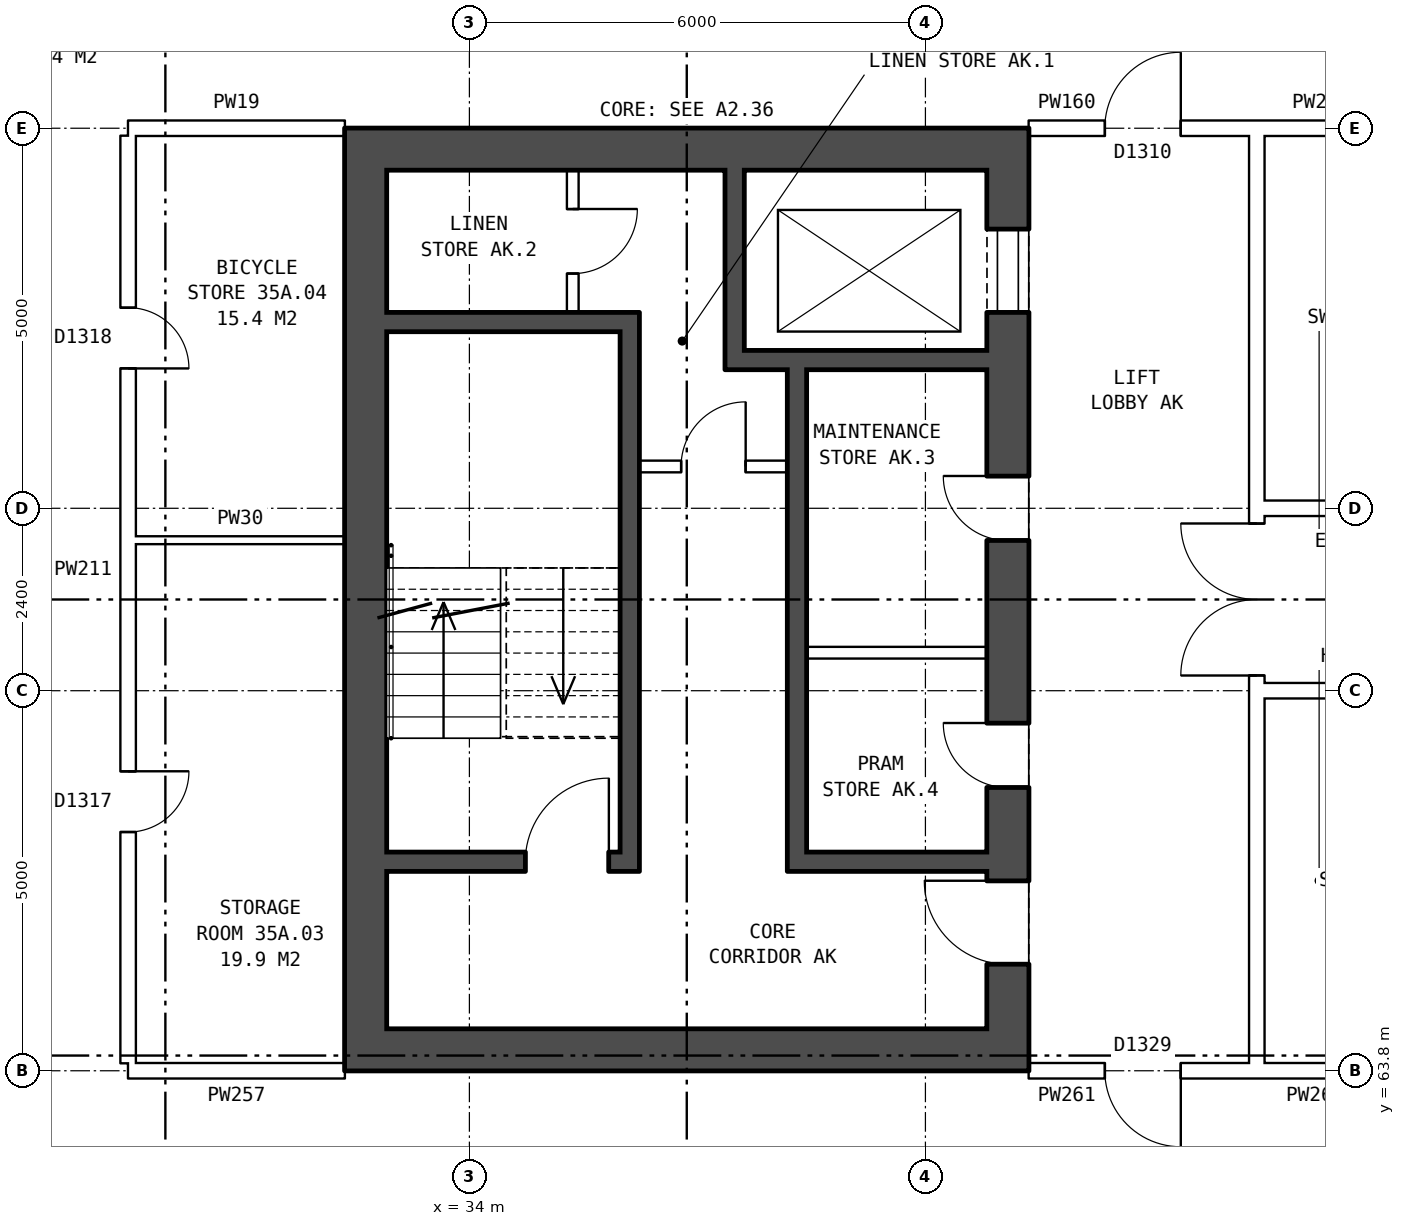
"""IFC4 building model, lengths in metres.
Left out: names, types, materials, properties, quantities, classifications, styles, units other than length and angle.
Written with IfcOpenShell. Run it as: python <this file> out.ifc"""

import sys

from ifc_helpers import new_model, si_unit, direction, frame, frame_2d, origin, place, context, subcontext, project, spatial, rectangle, extrude, element, fill, save


model = new_model("IFC4")
c1 = context("Model", 3, precision=1e-05, world=origin(), true_north=direction((0.0, 1.0)))
c2 = subcontext(c1, "Body", "Model", "MODEL_VIEW")
j1 = project(units=[si_unit("LENGTHUNIT", "METRE"), si_unit("PLANEANGLEUNIT", "RADIAN")], contexts=[c1])
p1 = place(None, origin())
s1 = spatial("IfcSite", under=j1, at=p1, CompositionType="ELEMENT")
p2 = place(p1, origin())
s2 = spatial("IfcBuilding", under=s1, at=p2, CompositionType="ELEMENT")
p3 = place(p2, frame((0.0, 0.0, 126.8)))
s3 = spatial("IfcBuildingStorey", under=s2, at=p3, CompositionType="ELEMENT", Elevation=126.8)
p4 = place(p3, frame((41.085, 76.2, 0.0), z_axis=(0.0, 0.0, 1.0), x_axis=(0.0, -1.0, 0.0)))
e1 = element("IfcWall", 1, at=p4, inside=s3, PredefinedType="SHEAR", context=c2, shape_type="SweptSolid", body=[
    extrude(rectangle(XDim=12.4, YDim=0.55, at=frame_2d((6.2, 0.0))), origin(), (0.0, 0.0, 1.0), 2.85),
])
p5 = place(p4, frame((1.325, 0.0, 0.0)))
e2 = element("IfcOpeningElement", 2, at=p5, cuts=e1, PredefinedType="OPENING", context=c2, shape_type="SweptSolid", body=[
    extrude(rectangle(XDim=1.1, YDim=2.1, at=frame_2d((0.55, 1.05))), frame((0.0, 0.285, 0.0), z_axis=(0.0, -1.0, 0.0), x_axis=(1.0, 0.0, 0.0)), (0.0, 0.0, 1.0), 0.57),
])
p6 = place(p4, frame((4.575, 0.0, 0.0)))
e3 = element("IfcOpeningElement", 3, at=p6, cuts=e1, PredefinedType="OPENING", context=c2, shape_type="SweptSolid", body=[
    extrude(rectangle(XDim=0.85, YDim=2.1, at=frame_2d((0.425, 1.05))), frame((0.0, 0.285, 0.0), z_axis=(0.0, -1.0, 0.0), x_axis=(1.0, 0.0, 0.0)), (0.0, 0.0, 1.0), 0.57),
])
p7 = place(p4, frame((7.825, 0.0, 0.0)))
e4 = element("IfcOpeningElement", 4, at=p7, cuts=e1, PredefinedType="OPENING", context=c2, shape_type="SweptSolid", body=[
    extrude(rectangle(XDim=0.85, YDim=2.1, at=frame_2d((0.425, 1.05))), frame((0.0, 0.285, 0.0), z_axis=(0.0, -1.0, 0.0), x_axis=(1.0, 0.0, 0.0)), (0.0, 0.0, 1.0), 0.57),
])
p8 = place(p4, frame((9.9, 0.0, 0.0)))
e5 = element("IfcOpeningElement", 5, at=p8, cuts=e1, PredefinedType="OPENING", context=c2, shape_type="SweptSolid", body=[
    extrude(rectangle(XDim=1.1, YDim=2.1, at=frame_2d((0.55, 1.05))), frame((0.0, 0.285, 0.0), z_axis=(0.0, -1.0, 0.0), x_axis=(1.0, 0.0, 0.0)), (0.0, 0.0, 1.0), 0.57),
])
p9 = place(p3, frame((32.635, 76.2, 0.0), z_axis=(0.0, 0.0, 1.0), x_axis=(0.0, -1.0, 0.0)))
e6 = element("IfcWall", 6, at=p9, inside=s3, PredefinedType="SHEAR", context=c2, shape_type="SweptSolid", body=[
    extrude(rectangle(XDim=12.4, YDim=0.55, at=frame_2d((6.2, 0.0))), origin(), (0.0, 0.0, 1.0), 2.85),
])
for number, where, z_axis, x_axis in (
    (7, (40.81, 75.925, 0.0), (0.0, 0.0, 1.0), (-1.0, 0.0, 0.0)),
    (8, (40.81, 64.075, 0.0), (0.0, 0.0, 1.0), (-1.0, 0.0, 0.0)),
):
    element("IfcWall", number, at=place(p3, frame(where, z_axis=z_axis, x_axis=x_axis)), inside=s3, PredefinedType="SHEAR", context=c2, shape_type="SweptSolid", body=[
        extrude(rectangle(XDim=7.9, YDim=0.55, at=frame_2d((3.95, 0.0))), origin(), (0.0, 0.0, 1.0), 2.85),
    ])
p10 = place(p3, frame((35.985, 73.65, 0.0), z_axis=(0.0, 0.0, 1.0), x_axis=(-1.0, 0.0, 0.0)))
e9 = element("IfcWall", 9, at=p10, inside=s3, PredefinedType="SHEAR", context=c2, shape_type="SweptSolid", body=[
    extrude(rectangle(XDim=3.075, YDim=0.25, at=frame_2d((1.538, 0.0))), origin(), (0.0, 0.0, 1.0), 2.85),
])
p11 = place(p3, frame((40.81, 73.15, 0.0), z_axis=(0.0, 0.0, 1.0), x_axis=(-1.0, 0.0, 0.0)))
e10 = element("IfcWall", 10, at=p11, inside=s3, PredefinedType="SHEAR", context=c2, shape_type="SweptSolid", body=[
    extrude(rectangle(XDim=3.445, YDim=0.25, at=frame_2d((1.723, 0.0))), origin(), (0.0, 0.0, 1.0), 2.85),
])
p12 = place(p3, frame((38.185, 71.75, 0.0), z_axis=(0.0, 0.0, 1.0), x_axis=(-1.0, 0.0, 0.0)))
e11 = element("IfcWall", 11, at=p12, inside=s3, PredefinedType="PARTITIONING", context=c2, shape_type="SweptSolid", body=[
    extrude(rectangle(XDim=1.95, YDim=0.15, at=frame_2d((0.975, 0.0))), origin(), (0.0, 0.0, 1.0), 2.85),
])
p13 = place(p12, frame((0.55, 0.0, 0.0)))
e12 = element("IfcOpeningElement", 12, at=p13, cuts=e11, PredefinedType="OPENING", context=c2, shape_type="SweptSolid", body=[
    extrude(rectangle(XDim=0.85, YDim=2.1, at=frame_2d((0.425, 1.05))), frame((0.0, 0.085, 0.0), z_axis=(0.0, -1.0, 0.0), x_axis=(1.0, 0.0, 0.0)), (0.0, 0.0, 1.0), 0.17),
])
p14 = place(p3, frame((40.81, 69.3, 0.0), z_axis=(0.0, 0.0, 1.0), x_axis=(-1.0, 0.0, 0.0)))
e13 = element("IfcWall", 13, at=p14, inside=s3, PredefinedType="PARTITIONING", context=c2, shape_type="SweptSolid", body=[
    extrude(rectangle(XDim=2.375, YDim=0.15, at=frame_2d((1.188, 0.0))), origin(), (0.0, 0.0, 1.0), 2.85),
])
p15 = place(p3, frame((40.81, 66.55, 0.0), z_axis=(0.0, 0.0, 1.0), x_axis=(-1.0, 0.0, 0.0)))
e14 = element("IfcWall", 14, at=p15, inside=s3, PredefinedType="SHEAR", context=c2, shape_type="SweptSolid", body=[
    extrude(rectangle(XDim=2.375, YDim=0.25, at=frame_2d((1.188, 0.0))), origin(), (0.0, 0.0, 1.0), 2.85),
])
p16 = place(p3, frame((35.985, 66.55, 0.0), z_axis=(0.0, 0.0, 1.0), x_axis=(-1.0, 0.0, 0.0)))
e15 = element("IfcWall", 15, at=p16, inside=s3, PredefinedType="SHEAR", context=c2, shape_type="SweptSolid", body=[
    extrude(rectangle(XDim=3.075, YDim=0.25, at=frame_2d((1.538, 0.0))), origin(), (0.0, 0.0, 1.0), 2.85),
])
p17 = place(p16, frame((0.15, 0.0, 0.0)))
e16 = element("IfcOpeningElement", 16, at=p17, cuts=e15, PredefinedType="OPENING", context=c2, shape_type="SweptSolid", body=[
    extrude(rectangle(XDim=1.1, YDim=2.1, at=frame_2d((0.55, 1.05))), frame((0.0, 0.135, 0.0), z_axis=(0.0, -1.0, 0.0), x_axis=(1.0, 0.0, 0.0)), (0.0, 0.0, 1.0), 0.27),
])
p18 = place(p3, frame((38.31, 73.025, 0.0), z_axis=(0.0, 0.0, 1.0), x_axis=(0.0, -1.0, 0.0)))
e17 = element("IfcWall", 17, at=p18, inside=s3, PredefinedType="SHEAR", context=c2, shape_type="SweptSolid", body=[
    extrude(rectangle(XDim=6.6, YDim=0.25, at=frame_2d((3.3, 0.0))), origin(), (0.0, 0.0, 1.0), 2.85),
])
p19 = place(p3, frame((37.49, 75.65, 0.0), z_axis=(0.0, 0.0, 1.0), x_axis=(0.0, -1.0, 0.0)))
e18 = element("IfcWall", 18, at=p19, inside=s3, PredefinedType="SHEAR", context=c2, shape_type="SweptSolid", body=[
    extrude(rectangle(XDim=2.375, YDim=0.25, at=frame_2d((1.188, 0.0))), origin(), (0.0, 0.0, 1.0), 2.85),
])
p20 = place(p3, frame((36.11, 73.775, 0.0), z_axis=(0.0, 0.0, 1.0), x_axis=(0.0, -1.0, 0.0)))
e19 = element("IfcWall", 19, at=p20, inside=s3, PredefinedType="SHEAR", context=c2, shape_type="SweptSolid", body=[
    extrude(rectangle(XDim=7.35, YDim=0.25, at=frame_2d((3.675, 0.0))), origin(), (0.0, 0.0, 1.0), 2.85),
])
p21 = place(p3, frame((35.36, 75.65, 0.0), z_axis=(0.0, 0.0, 1.0), x_axis=(0.0, -1.0, 0.0)))
e20 = element("IfcWall", 20, at=p21, inside=s3, PredefinedType="PARTITIONING", context=c2, shape_type="SweptSolid", body=[
    extrude(rectangle(XDim=1.875, YDim=0.15, at=frame_2d((0.938, 0.0))), origin(), (0.0, 0.0, 1.0), 2.85),
])
p22 = place(p21, frame((0.512, 0.0, 0.0)))
e21 = element("IfcOpeningElement", 21, at=p22, cuts=e20, PredefinedType="OPENING", context=c2, shape_type="SweptSolid", body=[
    extrude(rectangle(XDim=0.85, YDim=2.1, at=frame_2d((0.425, 1.05))), frame((0.0, 0.085, 0.0), z_axis=(0.0, -1.0, 0.0), x_axis=(1.0, 0.0, 0.0)), (0.0, 0.0, 1.0), 0.17),
])
p23 = place(p3, frame((44.36, 63.9, 0.0), z_axis=(0.0, 0.0, 1.0), x_axis=(0.0, 1.0, 0.0)))
e22 = element("IfcWall", 22, at=p23, inside=s3, PredefinedType="PARTITIONING", context=c2, shape_type="SweptSolid", body=[
    extrude(rectangle(XDim=12.2, YDim=0.2, at=frame_2d((6.1, 0.0))), origin(), (0.0, 0.0, 1.0), 2.85),
])
p24 = place(p23, frame((5.1, 0.0, 0.0)))
e23 = element("IfcOpeningElement", 23, at=p24, cuts=e22, PredefinedType="OPENING", context=c2, shape_type="SweptSolid", body=[
    extrude(rectangle(XDim=2.0, YDim=2.1, at=frame_2d((1.0, 1.05))), frame((0.0, 0.11, 0.0), z_axis=(0.0, -1.0, 0.0), x_axis=(1.0, 0.0, 0.0)), (0.0, 0.0, 1.0), 0.22),
])
p25 = place(p3, frame((29.51, 63.8, 0.0), z_axis=(0.0, 0.0, 1.0), x_axis=(1.0, 0.0, 0.0)))
e24 = element("IfcWall", 24, at=p25, inside=s3, PredefinedType="PARTITIONING", context=c2, shape_type="SweptSolid", body=[
    extrude(rectangle(XDim=2.85, YDim=0.2, at=frame_2d((1.425, 0.0))), origin(), (0.0, 0.0, 1.0), 2.85),
])
p26 = place(p3, frame((41.36, 63.8, 0.0), z_axis=(0.0, 0.0, 1.0), x_axis=(1.0, 0.0, 0.0)))
e25 = element("IfcWall", 25, at=p26, inside=s3, PredefinedType="PARTITIONING", context=c2, shape_type="SweptSolid", body=[
    extrude(rectangle(XDim=3.0, YDim=0.2, at=frame_2d((1.5, 0.0))), origin(), (0.0, 0.0, 1.0), 2.85),
])
p27 = place(p26, frame((1.0, 0.0, 0.0)))
e26 = element("IfcOpeningElement", 26, at=p27, cuts=e25, PredefinedType="OPENING", context=c2, shape_type="SweptSolid", body=[
    extrude(rectangle(XDim=1.0, YDim=2.1, at=frame_2d((0.5, 1.05))), frame((0.0, 0.11, 0.0), z_axis=(0.0, -1.0, 0.0), x_axis=(1.0, 0.0, 0.0)), (0.0, 0.0, 1.0), 0.22),
])
p28 = place(p3, frame((44.36, 63.8, 0.0), z_axis=(0.0, 0.0, 1.0), x_axis=(1.0, 0.0, 0.0)))
e27 = element("IfcWall", 27, at=p28, inside=s3, PredefinedType="PARTITIONING", context=c2, shape_type="SweptSolid", body=[
    extrude(rectangle(XDim=1.54, YDim=0.2, at=frame_2d((0.77, 0.0))), origin(), (0.0, 0.0, 1.0), 2.85),
])
p29 = place(p3, frame((44.36, 68.8, 0.0), z_axis=(0.0, 0.0, 1.0), x_axis=(1.0, 0.0, 0.0)))
e28 = element("IfcWall", 28, at=p29, inside=s3, PredefinedType="PARTITIONING", context=c2, shape_type="SweptSolid", body=[
    extrude(rectangle(XDim=19.28, YDim=0.2, at=frame_2d((9.64, 0.0))), origin(), (0.0, 0.0, 1.0), 2.85),
])
p30 = place(p29, frame((14.64, 0.0, 0.0)))
e29 = element("IfcOpeningElement", 29, at=p30, cuts=e28, PredefinedType="OPENING", context=c2, shape_type="SweptSolid", body=[
    extrude(rectangle(XDim=1.0, YDim=2.1, at=frame_2d((0.5, 1.05))), frame((0.0, 0.11, 0.0), z_axis=(0.0, -1.0, 0.0), x_axis=(1.0, 0.0, 0.0)), (0.0, 0.0, 1.0), 0.22),
])
p31 = place(p29, frame((5.64, 0.0, 0.0)))
e30 = element("IfcOpeningElement", 30, at=p31, cuts=e28, PredefinedType="OPENING", context=c2, shape_type="SweptSolid", body=[
    extrude(rectangle(XDim=1.0, YDim=2.1, at=frame_2d((0.5, 1.05))), frame((0.0, 0.11, 0.0), z_axis=(0.0, -1.0, 0.0), x_axis=(1.0, 0.0, 0.0)), (0.0, 0.0, 1.0), 0.22),
])
p32 = place(p3, frame((29.61, 70.78, 0.0), z_axis=(0.0, 0.0, 1.0), x_axis=(1.0, 0.0, 0.0)))
e31 = element("IfcWall", 31, at=p32, inside=s3, PredefinedType="PARTITIONING", context=c2, shape_type="SweptSolid", body=[
    extrude(rectangle(XDim=2.75, YDim=0.1, at=frame_2d((1.375, 0.0))), origin(), (0.0, 0.0, 1.0), 2.85),
])
p33 = place(p3, frame((44.36, 71.2, 0.0), z_axis=(0.0, 0.0, 1.0), x_axis=(1.0, 0.0, 0.0)))
e32 = element("IfcWall", 32, at=p33, inside=s3, PredefinedType="PARTITIONING", context=c2, shape_type="SweptSolid", body=[
    extrude(rectangle(XDim=19.28, YDim=0.2, at=frame_2d((9.64, 0.0))), origin(), (0.0, 0.0, 1.0), 2.85),
])
p34 = place(p33, frame((14.64, 0.0, 0.0)))
e33 = element("IfcOpeningElement", 33, at=p34, cuts=e32, PredefinedType="OPENING", context=c2, shape_type="SweptSolid", body=[
    extrude(rectangle(XDim=1.0, YDim=2.1, at=frame_2d((0.5, 1.05))), frame((0.0, 0.11, 0.0), z_axis=(0.0, -1.0, 0.0), x_axis=(1.0, 0.0, 0.0)), (0.0, 0.0, 1.0), 0.22),
])
p35 = place(p33, frame((5.64, 0.0, 0.0)))
e34 = element("IfcOpeningElement", 34, at=p35, cuts=e32, PredefinedType="OPENING", context=c2, shape_type="SweptSolid", body=[
    extrude(rectangle(XDim=1.0, YDim=2.1, at=frame_2d((0.5, 1.05))), frame((0.0, 0.11, 0.0), z_axis=(0.0, -1.0, 0.0), x_axis=(1.0, 0.0, 0.0)), (0.0, 0.0, 1.0), 0.22),
])
p36 = place(p3, frame((29.51, 76.2, 0.0), z_axis=(0.0, 0.0, 1.0), x_axis=(1.0, 0.0, 0.0)))
e35 = element("IfcWall", 35, at=p36, inside=s3, PredefinedType="PARTITIONING", context=c2, shape_type="SweptSolid", body=[
    extrude(rectangle(XDim=2.85, YDim=0.2, at=frame_2d((1.425, 0.0))), origin(), (0.0, 0.0, 1.0), 2.85),
])
p37 = place(p3, frame((41.36, 76.2, 0.0), z_axis=(0.0, 0.0, 1.0), x_axis=(1.0, 0.0, 0.0)))
e36 = element("IfcWall", 36, at=p37, inside=s3, PredefinedType="PARTITIONING", context=c2, shape_type="SweptSolid", body=[
    extrude(rectangle(XDim=3.0, YDim=0.2, at=frame_2d((1.5, 0.0))), origin(), (0.0, 0.0, 1.0), 2.85),
])
p38 = place(p37, frame((1.0, 0.0, 0.0)))
e37 = element("IfcOpeningElement", 37, at=p38, cuts=e36, PredefinedType="OPENING", context=c2, shape_type="SweptSolid", body=[
    extrude(rectangle(XDim=1.0, YDim=2.1, at=frame_2d((0.5, 1.05))), frame((0.0, 0.11, 0.0), z_axis=(0.0, -1.0, 0.0), x_axis=(1.0, 0.0, 0.0)), (0.0, 0.0, 1.0), 0.22),
])
p39 = place(p3, frame((44.36, 76.2, 0.0), z_axis=(0.0, 0.0, 1.0), x_axis=(1.0, 0.0, 0.0)))
e38 = element("IfcWall", 38, at=p39, inside=s3, PredefinedType="PARTITIONING", context=c2, shape_type="SweptSolid", body=[
    extrude(rectangle(XDim=1.54, YDim=0.2, at=frame_2d((0.77, 0.0))), origin(), (0.0, 0.0, 1.0), 2.85),
])
p40 = place(p3, frame((29.51, 63.9, 0.0), z_axis=(0.0, 0.0, 1.0), x_axis=(0.0, 1.0, 0.0)))
e39 = element("IfcWall", 39, at=p40, inside=s3, PredefinedType="PARTITIONING", context=c2, shape_type="SweptSolid", body=[
    extrude(rectangle(XDim=12.2, YDim=0.2, at=frame_2d((6.1, 0.0))), origin(), (0.0, 0.0, 1.0), 2.85),
])
p41 = place(p40, frame((3.04, 0.0, 0.0)))
e40 = element("IfcOpeningElement", 40, at=p41, cuts=e39, PredefinedType="OPENING", context=c2, shape_type="SweptSolid", body=[
    extrude(rectangle(XDim=0.8, YDim=2.1, at=frame_2d((0.4, 1.05))), frame((0.0, 0.11, 0.0), z_axis=(0.0, -1.0, 0.0), x_axis=(1.0, 0.0, 0.0)), (0.0, 0.0, 1.0), 0.22),
])
p42 = place(p40, frame((9.14, 0.0, 0.0)))
e41 = element("IfcOpeningElement", 41, at=p42, cuts=e39, PredefinedType="OPENING", context=c2, shape_type="SweptSolid", body=[
    extrude(rectangle(XDim=0.8, YDim=2.1, at=frame_2d((0.4, 1.05))), frame((0.0, 0.11, 0.0), z_axis=(0.0, -1.0, 0.0), x_axis=(1.0, 0.0, 0.0)), (0.0, 0.0, 1.0), 0.22),
])
p43 = place(p5, origin())
e42 = element("IfcDoor", 42, at=p43, inside=s3, OperationType="DOUBLE_DOOR_SLIDING", PredefinedType="DOOR", context=c2, shape_type="SweptSolid", body=[
    extrude(rectangle(XDim=1.1, YDim=2.1, at=frame_2d((0.55, 1.05))), frame((0.0, -0.21, 0.0), z_axis=(0.0, -1.0, 0.0), x_axis=(1.0, 0.0, 0.0)), (0.0, 0.0, 1.0), 0.05),
])
fill(e2, e42)
p44 = place(p6, frame((0.85, 0.0, 0.0), z_axis=(0.0, 0.0, 1.0), x_axis=(-1.0, 0.0, 0.0)))
e43 = element("IfcDoor", 43, at=p44, inside=s3, OperationType="SINGLE_SWING_RIGHT", PredefinedType="DOOR", context=c2, shape_type="SweptSolid", body=[
    extrude(rectangle(XDim=0.85, YDim=2.1, at=frame_2d((0.425, 1.05))), frame((0.0, 0.26, 0.0), z_axis=(0.0, -1.0, 0.0), x_axis=(1.0, 0.0, 0.0)), (0.0, 0.0, 1.0), 0.05),
])
fill(e3, e43)
p45 = place(p7, frame((0.85, 0.0, 0.0), z_axis=(0.0, 0.0, 1.0), x_axis=(-1.0, 0.0, 0.0)))
e44 = element("IfcDoor", 44, at=p45, inside=s3, OperationType="SINGLE_SWING_RIGHT", PredefinedType="DOOR", context=c2, shape_type="SweptSolid", body=[
    extrude(rectangle(XDim=0.85, YDim=2.1, at=frame_2d((0.425, 1.05))), frame((0.0, 0.26, 0.0), z_axis=(0.0, -1.0, 0.0), x_axis=(1.0, 0.0, 0.0)), (0.0, 0.0, 1.0), 0.05),
])
fill(e4, e44)
p46 = place(p8, frame((1.1, 0.0, 0.0), z_axis=(0.0, 0.0, 1.0), x_axis=(-1.0, 0.0, 0.0)))
e45 = element("IfcDoor", 45, at=p46, inside=s3, OperationType="SINGLE_SWING_RIGHT", PredefinedType="DOOR", context=c2, shape_type="SweptSolid", body=[
    extrude(rectangle(XDim=1.1, YDim=2.1, at=frame_2d((0.55, 1.05))), frame((0.0, 0.26, 0.0), z_axis=(0.0, -1.0, 0.0), x_axis=(1.0, 0.0, 0.0)), (0.0, 0.0, 1.0), 0.05),
])
fill(e5, e45)
p47 = place(p17, frame((1.1, 0.0, 0.0), z_axis=(0.0, 0.0, 1.0), x_axis=(-1.0, 0.0, 0.0)))
e46 = element("IfcDoor", 46, at=p47, inside=s3, OperationType="SINGLE_SWING_RIGHT", PredefinedType="DOOR", context=c2, shape_type="SweptSolid", body=[
    extrude(rectangle(XDim=1.1, YDim=2.1, at=frame_2d((0.55, 1.05))), frame((0.0, 0.025, 0.0), z_axis=(0.0, -1.0, 0.0), x_axis=(1.0, 0.0, 0.0)), (0.0, 0.0, 1.0), 0.05),
])
fill(e16, e46)
p48 = place(p13, frame((0.85, 0.0, 0.0), z_axis=(0.0, 0.0, 1.0), x_axis=(-1.0, 0.0, 0.0)))
e47 = element("IfcDoor", 47, at=p48, inside=s3, OperationType="SINGLE_SWING_RIGHT", PredefinedType="DOOR", context=c2, shape_type="SweptSolid", body=[
    extrude(rectangle(XDim=0.85, YDim=2.1, at=frame_2d((0.425, 1.05))), frame((0.0, 0.025, 0.0), z_axis=(0.0, -1.0, 0.0), x_axis=(1.0, 0.0, 0.0)), (0.0, 0.0, 1.0), 0.05),
])
fill(e12, e47)
p49 = place(p22, origin())
e48 = element("IfcDoor", 48, at=p49, inside=s3, OperationType="SINGLE_SWING_LEFT", PredefinedType="DOOR", context=c2, shape_type="SweptSolid", body=[
    extrude(rectangle(XDim=0.85, YDim=2.1, at=frame_2d((0.425, 1.05))), frame((0.0, 0.025, 0.0), z_axis=(0.0, -1.0, 0.0), x_axis=(1.0, 0.0, 0.0)), (0.0, 0.0, 1.0), 0.05),
])
fill(e21, e48)
p50 = place(p24, origin())
e49 = element("IfcDoor", 49, at=p50, inside=s3, OperationType="DOUBLE_DOOR_SINGLE_SWING", PredefinedType="DOOR", context=c2, shape_type="SweptSolid", body=[
    extrude(rectangle(XDim=2.0, YDim=2.1, at=frame_2d((1.0, 1.05))), frame((0.0, 0.025, 0.0), z_axis=(0.0, -1.0, 0.0), x_axis=(1.0, 0.0, 0.0)), (0.0, 0.0, 1.0), 0.05),
])
fill(e23, e49)
p51 = place(p27, frame((1.0, 0.0, 0.0), z_axis=(0.0, 0.0, 1.0), x_axis=(-1.0, 0.0, 0.0)))
e50 = element("IfcDoor", 50, at=p51, inside=s3, OperationType="SINGLE_SWING_LEFT", PredefinedType="DOOR", context=c2, shape_type="SweptSolid", body=[
    extrude(rectangle(XDim=1.0, YDim=2.1, at=frame_2d((0.5, 1.05))), frame((0.0, 0.025, 0.0), z_axis=(0.0, -1.0, 0.0), x_axis=(1.0, 0.0, 0.0)), (0.0, 0.0, 1.0), 0.05),
])
fill(e26, e50)
p52 = place(p38, origin())
e51 = element("IfcDoor", 51, at=p52, inside=s3, OperationType="SINGLE_SWING_RIGHT", PredefinedType="DOOR", context=c2, shape_type="SweptSolid", body=[
    extrude(rectangle(XDim=1.0, YDim=2.1, at=frame_2d((0.5, 1.05))), frame((0.0, 0.025, 0.0), z_axis=(0.0, -1.0, 0.0), x_axis=(1.0, 0.0, 0.0)), (0.0, 0.0, 1.0), 0.05),
])
fill(e37, e51)
p53 = place(p41, frame((0.8, 0.0, 0.0), z_axis=(0.0, 0.0, 1.0), x_axis=(-1.0, 0.0, 0.0)))
e52 = element("IfcDoor", 52, at=p53, inside=s3, OperationType="SINGLE_SWING_LEFT", PredefinedType="DOOR", context=c2, shape_type="SweptSolid", body=[
    extrude(rectangle(XDim=0.8, YDim=2.1, at=frame_2d((0.4, 1.05))), frame((0.0, 0.025, 0.0), z_axis=(0.0, -1.0, 0.0), x_axis=(1.0, 0.0, 0.0)), (0.0, 0.0, 1.0), 0.05),
])
fill(e40, e52)
p54 = place(p42, frame((0.8, 0.0, 0.0), z_axis=(0.0, 0.0, 1.0), x_axis=(-1.0, 0.0, 0.0)))
e53 = element("IfcDoor", 53, at=p54, inside=s3, OperationType="SINGLE_SWING_RIGHT", PredefinedType="DOOR", context=c2, shape_type="SweptSolid", body=[
    extrude(rectangle(XDim=0.8, YDim=2.1, at=frame_2d((0.4, 1.05))), frame((0.0, 0.025, 0.0), z_axis=(0.0, -1.0, 0.0), x_axis=(1.0, 0.0, 0.0)), (0.0, 0.0, 1.0), 0.05),
])
fill(e41, e53)
save(model, sys.argv[1])
